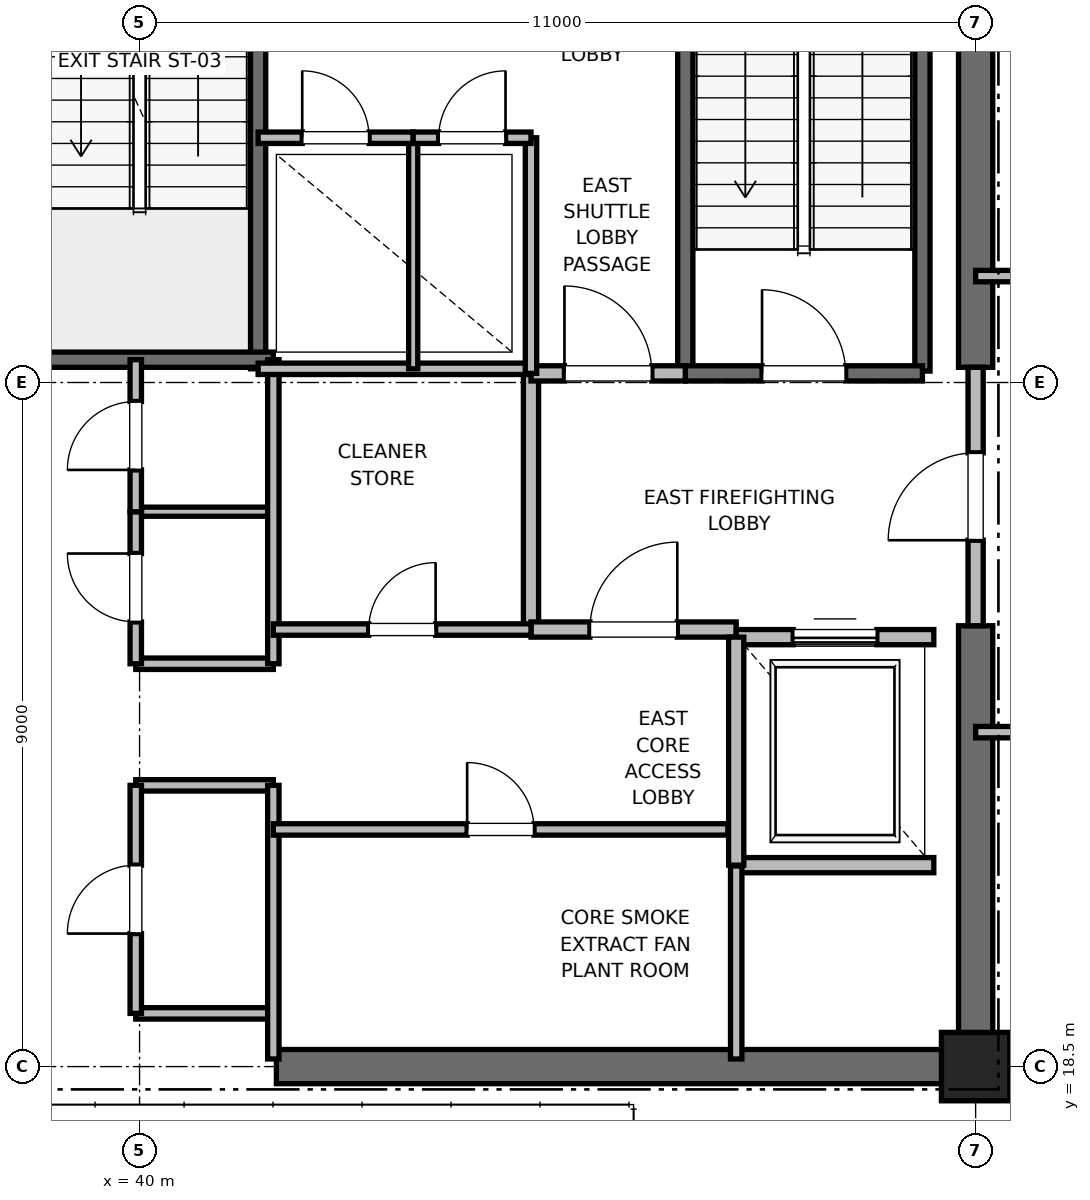
"""IFC4 building model, lengths in metres.
Left out: names, types, materials, properties, quantities, classifications, styles, units other than length and angle.
Written with IfcOpenShell. Run it as: python <this file> out.ifc"""

import sys

from ifc_helpers import new_model, si_unit, direction, frame, frame_2d, origin, origin_2d, place, context, subcontext, project, spatial, rectangle, extrude, element, fill, save


model = new_model("IFC4")
c1 = context("Model", 3, precision=1e-05, world=origin(), true_north=direction((0.0, 1.0)))
c2 = subcontext(c1, "Body", "Model", "MODEL_VIEW")
j1 = project(units=[si_unit("LENGTHUNIT", "METRE"), si_unit("PLANEANGLEUNIT", "RADIAN")], contexts=[c1])
p1 = place(None, origin())
s1 = spatial("IfcSite", under=j1, at=p1, CompositionType="ELEMENT")
p2 = place(p1, origin())
s2 = spatial("IfcBuilding", under=s1, at=p2, CompositionType="ELEMENT")
p3 = place(p2, frame((0.0, 0.0, 295.2)))
s3 = spatial("IfcBuildingStorey", under=s2, at=p3, CompositionType="ELEMENT", Elevation=295.2)
p4 = place(p3, frame((51.0, 18.5, 0.0), z_axis=(0.0, 0.0, 1.0), x_axis=(1.0, 0.0, 0.0)))
e1 = element("IfcColumn", 1, at=p4, inside=s3, PredefinedType="PILASTER", context=c2, shape_type="SweptSolid", body=[
    extrude(rectangle(XDim=0.9, YDim=0.9, at=origin_2d()), origin(), (0.0, 0.0, 1.0), 5.8),
])
p5 = place(p3, frame((41.8, 18.5, 0.0), z_axis=(0.0, 0.0, 1.0), x_axis=(1.0, 0.0, 0.0)))
e2 = element("IfcWall", 2, at=p5, inside=s3, PredefinedType="SHEAR", context=c2, shape_type="SweptSolid", body=[
    extrude(rectangle(XDim=9.2, YDim=0.45, at=frame_2d((4.6, 0.0))), origin(), (0.0, 0.0, 1.0), 5.5),
])
p6 = place(p3, frame((51.0, 18.5, 0.0), z_axis=(0.0, 0.0, 1.0), x_axis=(0.0, 1.0, 0.0)))
e3 = element("IfcWall", 3, at=p6, inside=s3, PredefinedType="SHEAR", context=c2, shape_type="SweptSolid", body=[
    extrude(rectangle(XDim=5.8, YDim=0.45, at=frame_2d((2.9, 0.0))), origin(), (0.0, 0.0, 1.0), 5.5),
])
p7 = place(p3, frame((51.0, 27.7, 0.0), z_axis=(0.0, 0.0, 1.0), x_axis=(0.0, 1.0, 0.0)))
e4 = element("IfcWall", 4, at=p7, inside=s3, PredefinedType="SHEAR", context=c2, shape_type="SweptSolid", body=[
    extrude(rectangle(XDim=8.8, YDim=0.45, at=frame_2d((4.4, 0.0))), origin(), (0.0, 0.0, 1.0), 5.5),
])
p8 = place(p3, frame((50.3, 27.65, 0.0), z_axis=(0.0, 0.0, 1.0), x_axis=(0.0, 1.0, 0.0)))
e5 = element("IfcWall", 5, at=p8, inside=s3, PredefinedType="SOLIDWALL", context=c2, shape_type="SweptSolid", body=[
    extrude(rectangle(XDim=8.15, YDim=0.2, at=frame_2d((4.075, 0.0))), origin(), (0.0, 0.0, 1.0), 5.5),
])
p9 = place(p3, frame((47.18, 27.62, 0.0), z_axis=(0.0, 0.0, 1.0), x_axis=(0.0, 1.0, 0.0)))
e6 = element("IfcWall", 6, at=p9, inside=s3, PredefinedType="SOLIDWALL", context=c2, shape_type="SweptSolid", body=[
    extrude(rectangle(XDim=8.18, YDim=0.2, at=frame_2d((4.09, 0.0))), origin(), (0.0, 0.0, 1.0), 5.5),
])
p10 = place(p3, frame((47.18, 27.62, 0.0), z_axis=(0.0, 0.0, 1.0), x_axis=(1.0, 0.0, 0.0)))
e7 = element("IfcWall", 7, at=p10, inside=s3, PredefinedType="SOLIDWALL", context=c2, shape_type="SweptSolid", body=[
    extrude(rectangle(XDim=3.12, YDim=0.2, at=frame_2d((1.56, 0.0))), origin(), (0.0, 0.0, 1.0), 5.5),
])
p11 = place(p10, frame((1.01, 0.0, 0.0)))
e8 = element("IfcOpeningElement", 8, at=p11, cuts=e7, PredefinedType="OPENING", context=c2, shape_type="SweptSolid", body=[
    extrude(rectangle(XDim=1.1, YDim=2.15, at=frame_2d((0.55, 1.075))), frame((0.0, 0.1, 0.0), z_axis=(0.0, -1.0, 0.0), x_axis=(1.0, 0.0, 0.0)), (0.0, 0.0, 1.0), 0.2),
])
p12 = place(p3, frame((41.56, 27.68, 0.0), z_axis=(0.0, 0.0, 1.0), x_axis=(0.0, 1.0, 0.0)))
e9 = element("IfcWall", 9, at=p12, inside=s3, PredefinedType="SOLIDWALL", context=c2, shape_type="SweptSolid", body=[
    extrude(rectangle(XDim=8.57, YDim=0.2, at=frame_2d((4.285, 0.0))), origin(), (0.0, 0.0, 1.0), 5.5),
])
p13 = place(p3, frame((38.44, 27.8, 0.0), z_axis=(0.0, 0.0, 1.0), x_axis=(1.0, 0.0, 0.0)))
e10 = element("IfcWall", 10, at=p13, inside=s3, PredefinedType="SOLIDWALL", context=c2, shape_type="SweptSolid", body=[
    extrude(rectangle(XDim=3.32, YDim=0.2, at=frame_2d((1.66, 0.0))), origin(), (0.0, 0.0, 1.0), 5.5),
])
p14 = place(p3, frame((45.15, 24.25, 0.0), z_axis=(0.0, 0.0, 1.0), x_axis=(0.0, 1.0, 0.0)))
e11 = element("IfcWall", 11, at=p14, inside=s3, PredefinedType="PARTITIONING", context=c2, shape_type="SweptSolid", body=[
    extrude(rectangle(XDim=3.37, YDim=0.2, at=frame_2d((1.685, 0.0))), origin(), (0.0, 0.0, 1.0), 5.5),
])
p15 = place(p3, frame((45.15, 24.25, 0.0), z_axis=(0.0, 0.0, 1.0), x_axis=(1.0, 0.0, 0.0)))
e12 = element("IfcWall", 12, at=p15, inside=s3, PredefinedType="PARTITIONING", context=c2, shape_type="SweptSolid", body=[
    extrude(rectangle(XDim=2.7, YDim=0.2, at=frame_2d((1.35, 0.0))), origin(), (0.0, 0.0, 1.0), 5.5),
])
p16 = place(p15, frame((0.775, 0.0, 0.0)))
e13 = element("IfcOpeningElement", 13, at=p16, cuts=e12, PredefinedType="OPENING", context=c2, shape_type="SweptSolid", body=[
    extrude(rectangle(XDim=1.15, YDim=2.2, at=frame_2d((0.575, 1.1))), frame((0.0, 0.1, 0.0), z_axis=(0.0, -1.0, 0.0), x_axis=(1.0, 0.0, 0.0)), (0.0, 0.0, 1.0), 0.2),
])
p17 = place(p3, frame((45.15, 27.62, 0.0), z_axis=(0.0, 0.0, 1.0), x_axis=(1.0, 0.0, 0.0)))
e14 = element("IfcWall", 14, at=p17, inside=s3, PredefinedType="PARTITIONING", context=c2, shape_type="SweptSolid", body=[
    extrude(rectangle(XDim=2.03, YDim=0.2, at=frame_2d((1.015, 0.0))), origin(), (0.0, 0.0, 1.0), 5.5),
])
p18 = place(p17, frame((0.44, 0.0, 0.0)))
e15 = element("IfcOpeningElement", 15, at=p18, cuts=e14, PredefinedType="OPENING", context=c2, shape_type="SweptSolid", body=[
    extrude(rectangle(XDim=1.15, YDim=2.2, at=frame_2d((0.575, 1.1))), frame((0.0, 0.1, 0.0), z_axis=(0.0, -1.0, 0.0), x_axis=(1.0, 0.0, 0.0)), (0.0, 0.0, 1.0), 0.2),
])
p19 = place(p3, frame((51.0, 24.3, 0.0), z_axis=(0.0, 0.0, 1.0), x_axis=(0.0, 1.0, 0.0)))
e16 = element("IfcWall", 16, at=p19, inside=s3, PredefinedType="PARTITIONING", context=c2, shape_type="SweptSolid", body=[
    extrude(rectangle(XDim=3.4, YDim=0.2, at=frame_2d((1.7, 0.0))), origin(), (0.0, 0.0, 1.0), 4.58),
])
p20 = place(p19, frame((1.125, 0.0, 0.0)))
e17 = element("IfcOpeningElement", 17, at=p20, cuts=e16, PredefinedType="OPENING", context=c2, shape_type="SweptSolid", body=[
    extrude(rectangle(XDim=1.15, YDim=2.2, at=frame_2d((0.575, 1.1))), frame((0.0, 0.1, 0.0), z_axis=(0.0, -1.0, 0.0), x_axis=(1.0, 0.0, 0.0)), (0.0, 0.0, 1.0), 0.2),
])
p21 = place(p3, frame((47.85, 21.15, 0.0), z_axis=(0.0, 0.0, 1.0), x_axis=(1.0, 0.0, 0.0)))
e18 = element("IfcWall", 18, at=p21, inside=s3, PredefinedType="SOLIDWALL", context=c2, shape_type="SweptSolid", body=[
    extrude(rectangle(XDim=2.6, YDim=0.2, at=frame_2d((1.3, 0.0))), origin(), (0.0, 0.0, 1.0), 5.5),
])
p22 = place(p3, frame((50.45, 24.15, 0.0), z_axis=(0.0, 0.0, 1.0), x_axis=(-1.0, 0.0, 0.0)))
e19 = element("IfcWall", 19, at=p22, inside=s3, PredefinedType="SOLIDWALL", context=c2, shape_type="SweptSolid", body=[
    extrude(rectangle(XDim=2.6, YDim=0.2, at=frame_2d((1.3, 0.0))), origin(), (0.0, 0.0, 1.0), 4.58),
])
p23 = place(p22, frame((0.75, 0.0, 0.0)))
e20 = element("IfcOpeningElement", 20, at=p23, cuts=e19, PredefinedType="OPENING", context=c2, shape_type="SweptSolid", body=[
    extrude(rectangle(XDim=1.1, YDim=2.2, at=frame_2d((0.55, 1.1))), frame((0.0, 0.1, 0.0), z_axis=(0.0, -1.0, 0.0), x_axis=(1.0, 0.0, 0.0)), (0.0, 0.0, 1.0), 0.2),
])
p24 = place(p3, frame((47.85, 24.15, 0.0), z_axis=(0.0, 0.0, 1.0), x_axis=(0.0, -1.0, 0.0)))
e21 = element("IfcWall", 21, at=p24, inside=s3, PredefinedType="SOLIDWALL", context=c2, shape_type="SweptSolid", body=[
    extrude(rectangle(XDim=3.0, YDim=0.2, at=frame_2d((1.5, 0.0))), origin(), (0.0, 0.0, 1.0), 5.5),
])
for number, where, z_axis, x_axis in (
    (22, (39.95, 19.2, 0.0), (0.0, 0.0, 1.0), (1.0, 0.0, 0.0)),
    (23, (39.95, 22.2, 0.0), (0.0, 0.0, 1.0), (1.0, 0.0, 0.0)),
    (24, (39.95, 23.8, 0.0), (0.0, 0.0, 1.0), (1.0, 0.0, 0.0)),
):
    element("IfcWall", number, at=place(p3, frame(where, z_axis=z_axis, x_axis=x_axis)), inside=s3, PredefinedType="PARTITIONING", context=c2, shape_type="SweptSolid", body=[
        extrude(rectangle(XDim=1.81, YDim=0.15, at=frame_2d((0.905, 0.0))), origin(), (0.0, 0.0, 1.0), 2.85),
    ])
p25 = place(p3, frame((39.95, 25.8, 0.0), z_axis=(0.0, 0.0, 1.0), x_axis=(1.0, 0.0, 0.0)))
e25 = element("IfcWall", 25, at=p25, inside=s3, PredefinedType="PARTITIONING", context=c2, shape_type="SweptSolid", body=[
    extrude(rectangle(XDim=1.81, YDim=0.12, at=frame_2d((0.905, 0.0))), origin(), (0.0, 0.0, 1.0), 2.85),
])
p26 = place(p3, frame((41.76, 18.6, 0.0), z_axis=(0.0, 0.0, 1.0), x_axis=(0.0, 1.0, 0.0)))
e26 = element("IfcWall", 26, at=p26, inside=s3, PredefinedType="PARTITIONING", context=c2, shape_type="SweptSolid", body=[
    extrude(rectangle(XDim=3.6, YDim=0.15, at=frame_2d((1.8, 0.0))), origin(), (0.0, 0.0, 1.0), 2.85),
])
p27 = place(p3, frame((41.76, 23.8, 0.0), z_axis=(0.0, 0.0, 1.0), x_axis=(0.0, 1.0, 0.0)))
e27 = element("IfcWall", 27, at=p27, inside=s3, PredefinedType="PARTITIONING", context=c2, shape_type="SweptSolid", body=[
    extrude(rectangle(XDim=4.0, YDim=0.15, at=frame_2d((2.0, 0.0))), origin(), (0.0, 0.0, 1.0), 2.85),
])
p28 = place(p3, frame((39.95, 19.2, 0.0), z_axis=(0.0, 0.0, 1.0), x_axis=(0.0, 1.0, 0.0)))
e28 = element("IfcWall", 28, at=p28, inside=s3, PredefinedType="PARTITIONING", context=c2, shape_type="SweptSolid", body=[
    extrude(rectangle(XDim=3.0, YDim=0.15, at=frame_2d((1.5, 0.0))), origin(), (0.0, 0.0, 1.0), 2.85),
])
p29 = place(p28, frame((1.05, 0.0, 0.0)))
e29 = element("IfcOpeningElement", 29, at=p29, cuts=e28, PredefinedType="OPENING", context=c2, shape_type="SweptSolid", body=[
    extrude(rectangle(XDim=0.9, YDim=2.1, at=frame_2d((0.45, 1.05))), frame((0.0, 0.075, 0.0), z_axis=(0.0, -1.0, 0.0), x_axis=(1.0, 0.0, 0.0)), (0.0, 0.0, 1.0), 0.15),
])
p30 = place(p3, frame((39.95, 23.8, 0.0), z_axis=(0.0, 0.0, 1.0), x_axis=(0.0, 1.0, 0.0)))
e30 = element("IfcWall", 30, at=p30, inside=s3, PredefinedType="PARTITIONING", context=c2, shape_type="SweptSolid", body=[
    extrude(rectangle(XDim=2.0, YDim=0.15, at=frame_2d((1.0, 0.0))), origin(), (0.0, 0.0, 1.0), 2.85),
])
p31 = place(p30, frame((0.55, 0.0, 0.0)))
e31 = element("IfcOpeningElement", 31, at=p31, cuts=e30, PredefinedType="OPENING", context=c2, shape_type="SweptSolid", body=[
    extrude(rectangle(XDim=0.9, YDim=2.1, at=frame_2d((0.45, 1.05))), frame((0.0, 0.075, 0.0), z_axis=(0.0, -1.0, 0.0), x_axis=(1.0, 0.0, 0.0)), (0.0, 0.0, 1.0), 0.15),
])
p32 = place(p3, frame((39.95, 25.8, 0.0), z_axis=(0.0, 0.0, 1.0), x_axis=(0.0, 1.0, 0.0)))
e32 = element("IfcWall", 32, at=p32, inside=s3, PredefinedType="PARTITIONING", context=c2, shape_type="SweptSolid", body=[
    extrude(rectangle(XDim=2.0, YDim=0.15, at=frame_2d((1.0, 0.0))), origin(), (0.0, 0.0, 1.0), 2.85),
])
p33 = place(p32, frame((0.55, 0.0, 0.0)))
e33 = element("IfcOpeningElement", 33, at=p33, cuts=e32, PredefinedType="OPENING", context=c2, shape_type="SweptSolid", body=[
    extrude(rectangle(XDim=0.9, YDim=2.1, at=frame_2d((0.45, 1.05))), frame((0.0, 0.075, 0.0), z_axis=(0.0, -1.0, 0.0), x_axis=(1.0, 0.0, 0.0)), (0.0, 0.0, 1.0), 0.15),
])
p34 = place(p3, frame((41.56, 27.68, 0.0), z_axis=(0.0, 0.0, 1.0), x_axis=(1.0, 0.0, 0.0)))
e34 = element("IfcWall", 34, at=p34, inside=s3, PredefinedType="PARTITIONING", context=c2, shape_type="SweptSolid", body=[
    extrude(rectangle(XDim=3.59, YDim=0.15, at=frame_2d((1.795, 0.0))), origin(), (0.0, 0.0, 1.0), 2.85),
])
p35 = place(p3, frame((47.85, 18.6, 0.0), z_axis=(0.0, 0.0, 1.0), x_axis=(0.0, 1.0, 0.0)))
e35 = element("IfcWall", 35, at=p35, inside=s3, PredefinedType="PARTITIONING", context=c2, shape_type="SweptSolid", body=[
    extrude(rectangle(XDim=2.54, YDim=0.15, at=frame_2d((1.27, 0.0))), origin(), (0.0, 0.0, 1.0), 2.85),
])
p36 = place(p3, frame((41.76, 21.62, 0.0), z_axis=(0.0, 0.0, 1.0), x_axis=(1.0, 0.0, 0.0)))
e36 = element("IfcWall", 36, at=p36, inside=s3, PredefinedType="PARTITIONING", context=c2, shape_type="SweptSolid", body=[
    extrude(rectangle(XDim=5.98, YDim=0.15, at=frame_2d((2.99, 0.0))), origin(), (0.0, 0.0, 1.0), 2.85),
])
p37 = place(p36, frame((2.55, 0.0, 0.0)))
e37 = element("IfcOpeningElement", 37, at=p37, cuts=e36, PredefinedType="OPENING", context=c2, shape_type="SweptSolid", body=[
    extrude(rectangle(XDim=0.88, YDim=2.1, at=frame_2d((0.44, 1.05))), frame((0.0, 0.075, 0.0), z_axis=(0.0, -1.0, 0.0), x_axis=(1.0, 0.0, 0.0)), (0.0, 0.0, 1.0), 0.15),
])
p38 = place(p3, frame((41.76, 24.25, 0.0), z_axis=(0.0, 0.0, 1.0), x_axis=(1.0, 0.0, 0.0)))
e38 = element("IfcWall", 38, at=p38, inside=s3, PredefinedType="PARTITIONING", context=c2, shape_type="SweptSolid", body=[
    extrude(rectangle(XDim=3.39, YDim=0.15, at=frame_2d((1.695, 0.0))), origin(), (0.0, 0.0, 1.0), 2.85),
])
p39 = place(p38, frame((1.255, 0.0, 0.0)))
e39 = element("IfcOpeningElement", 39, at=p39, cuts=e38, PredefinedType="OPENING", context=c2, shape_type="SweptSolid", body=[
    extrude(rectangle(XDim=0.88, YDim=2.1, at=frame_2d((0.44, 1.05))), frame((0.0, 0.075, 0.0), z_axis=(0.0, -1.0, 0.0), x_axis=(1.0, 0.0, 0.0)), (0.0, 0.0, 1.0), 0.15),
])
p40 = place(p3, frame((45.15, 27.62, 0.0), z_axis=(0.0, 0.0, 1.0), x_axis=(0.0, 1.0, 0.0)))
e40 = element("IfcWall", 40, at=p40, inside=s3, PredefinedType="PARTITIONING", context=c2, shape_type="SweptSolid", body=[
    extrude(rectangle(XDim=3.1, YDim=0.15, at=frame_2d((1.55, 0.0))), origin(), (0.0, 0.0, 1.0), 2.85),
])
p41 = place(p3, frame((43.6, 27.68, 0.0), z_axis=(0.0, 0.0, 1.0), x_axis=(0.0, 1.0, 0.0)))
e41 = element("IfcWall", 41, at=p41, inside=s3, PredefinedType="PARTITIONING", context=c2, shape_type="SweptSolid", body=[
    extrude(rectangle(XDim=3.04, YDim=0.12, at=frame_2d((1.52, 0.0))), origin(), (0.0, 0.0, 1.0), 2.85),
])
p42 = place(p3, frame((41.56, 30.72, 0.0), z_axis=(0.0, 0.0, 1.0), x_axis=(1.0, 0.0, 0.0)))
e42 = element("IfcWall", 42, at=p42, inside=s3, PredefinedType="PARTITIONING", context=c2, shape_type="SweptSolid", body=[
    extrude(rectangle(XDim=2.04, YDim=0.15, at=frame_2d((1.02, 0.0))), origin(), (0.0, 0.0, 1.0), 2.85),
])
p43 = place(p42, frame((0.58, 0.0, 0.0)))
e43 = element("IfcOpeningElement", 43, at=p43, cuts=e42, PredefinedType="OPENING", context=c2, shape_type="SweptSolid", body=[
    extrude(rectangle(XDim=0.88, YDim=2.1, at=frame_2d((0.44, 1.05))), frame((0.0, 0.075, 0.0), z_axis=(0.0, -1.0, 0.0), x_axis=(1.0, 0.0, 0.0)), (0.0, 0.0, 1.0), 0.15),
])
p44 = place(p3, frame((43.6, 30.72, 0.0), z_axis=(0.0, 0.0, 1.0), x_axis=(1.0, 0.0, 0.0)))
e44 = element("IfcWall", 44, at=p44, inside=s3, PredefinedType="PARTITIONING", context=c2, shape_type="SweptSolid", body=[
    extrude(rectangle(XDim=1.55, YDim=0.15, at=frame_2d((0.775, 0.0))), origin(), (0.0, 0.0, 1.0), 2.85),
])
p45 = place(p44, frame((0.335, 0.0, 0.0)))
e45 = element("IfcOpeningElement", 45, at=p45, cuts=e44, PredefinedType="OPENING", context=c2, shape_type="SweptSolid", body=[
    extrude(rectangle(XDim=0.88, YDim=2.1, at=frame_2d((0.44, 1.05))), frame((0.0, 0.075, 0.0), z_axis=(0.0, -1.0, 0.0), x_axis=(1.0, 0.0, 0.0)), (0.0, 0.0, 1.0), 0.15),
])
p46 = place(p3, frame((51.0, 22.9, 0.0), z_axis=(0.0, 0.0, 1.0), x_axis=(1.0, 0.0, 0.0)))
e46 = element("IfcWall", 46, at=p46, inside=s3, PredefinedType="PARTITIONING", context=c2, shape_type="SweptSolid", body=[
    extrude(rectangle(XDim=3.0, YDim=0.15, at=frame_2d((1.5, 0.0))), origin(), (0.0, 0.0, 1.0), 2.85),
])
p47 = place(p46, frame((1.025, 0.0, 0.0)))
e47 = element("IfcOpeningElement", 47, at=p47, cuts=e46, PredefinedType="OPENING", context=c2, shape_type="SweptSolid", body=[
    extrude(rectangle(XDim=0.95, YDim=2.15, at=frame_2d((0.475, 1.075))), frame((0.0, 0.075, 0.0), z_axis=(0.0, -1.0, 0.0), x_axis=(1.0, 0.0, 0.0)), (0.0, 0.0, 1.0), 0.15),
])
p48 = place(p3, frame((51.0, 28.9, 0.0), z_axis=(0.0, 0.0, 1.0), x_axis=(1.0, 0.0, 0.0)))
e48 = element("IfcWall", 48, at=p48, inside=s3, PredefinedType="PARTITIONING", context=c2, shape_type="SweptSolid", body=[
    extrude(rectangle(XDim=3.0, YDim=0.15, at=frame_2d((1.5, 0.0))), origin(), (0.0, 0.0, 1.0), 2.85),
])
p49 = place(p48, frame((1.025, 0.0, 0.0)))
e49 = element("IfcOpeningElement", 49, at=p49, cuts=e48, PredefinedType="OPENING", context=c2, shape_type="SweptSolid", body=[
    extrude(rectangle(XDim=0.95, YDim=2.15, at=frame_2d((0.475, 1.075))), frame((0.0, 0.075, 0.0), z_axis=(0.0, -1.0, 0.0), x_axis=(1.0, 0.0, 0.0)), (0.0, 0.0, 1.0), 0.15),
])
p50 = place(p11, origin())
e50 = element("IfcDoor", 50, at=p50, inside=s3, OperationType="SINGLE_SWING_LEFT", PredefinedType="DOOR", context=c2, shape_type="SweptSolid", body=[
    extrude(rectangle(XDim=1.1, YDim=2.15, at=frame_2d((0.55, 1.075))), frame((0.0, 0.025, 0.0), z_axis=(0.0, -1.0, 0.0), x_axis=(1.0, 0.0, 0.0)), (0.0, 0.0, 1.0), 0.05),
])
fill(e8, e50)
p51 = place(p16, origin())
e51 = element("IfcDoor", 51, at=p51, inside=s3, OperationType="SINGLE_SWING_RIGHT", PredefinedType="DOOR", context=c2, shape_type="SweptSolid", body=[
    extrude(rectangle(XDim=1.15, YDim=2.2, at=frame_2d((0.575, 1.1))), frame((0.0, 0.025, 0.0), z_axis=(0.0, -1.0, 0.0), x_axis=(1.0, 0.0, 0.0)), (0.0, 0.0, 1.0), 0.05),
])
fill(e13, e51)
p52 = place(p18, origin())
e52 = element("IfcDoor", 52, at=p52, inside=s3, OperationType="SINGLE_SWING_LEFT", PredefinedType="DOOR", context=c2, shape_type="SweptSolid", body=[
    extrude(rectangle(XDim=1.15, YDim=2.2, at=frame_2d((0.575, 1.1))), frame((0.0, 0.025, 0.0), z_axis=(0.0, -1.0, 0.0), x_axis=(1.0, 0.0, 0.0)), (0.0, 0.0, 1.0), 0.05),
])
fill(e15, e52)
p53 = place(p20, origin())
e53 = element("IfcDoor", 53, at=p53, inside=s3, OperationType="SINGLE_SWING_LEFT", PredefinedType="DOOR", context=c2, shape_type="SweptSolid", body=[
    extrude(rectangle(XDim=1.15, YDim=2.2, at=frame_2d((0.575, 1.1))), frame((0.0, 0.025, 0.0), z_axis=(0.0, -1.0, 0.0), x_axis=(1.0, 0.0, 0.0)), (0.0, 0.0, 1.0), 0.05),
])
fill(e17, e53)
p54 = place(p23, origin())
e54 = element("IfcDoor", 54, at=p54, inside=s3, OperationType="SLIDING_TO_RIGHT", PredefinedType="DOOR", context=c2, shape_type="SweptSolid", body=[
    extrude(rectangle(XDim=1.1, YDim=2.2, at=frame_2d((0.55, 1.1))), frame((0.0, 0.025, 0.0), z_axis=(0.0, -1.0, 0.0), x_axis=(1.0, 0.0, 0.0)), (0.0, 0.0, 1.0), 0.05),
])
fill(e20, e54)
p55 = place(p29, origin())
e55 = element("IfcDoor", 55, at=p55, inside=s3, OperationType="SINGLE_SWING_LEFT", PredefinedType="DOOR", context=c2, shape_type="SweptSolid", body=[
    extrude(rectangle(XDim=0.9, YDim=2.1, at=frame_2d((0.45, 1.05))), frame((0.0, 0.025, 0.0), z_axis=(0.0, -1.0, 0.0), x_axis=(1.0, 0.0, 0.0)), (0.0, 0.0, 1.0), 0.05),
])
fill(e29, e55)
p56 = place(p31, origin())
e56 = element("IfcDoor", 56, at=p56, inside=s3, OperationType="SINGLE_SWING_RIGHT", PredefinedType="DOOR", context=c2, shape_type="SweptSolid", body=[
    extrude(rectangle(XDim=0.9, YDim=2.1, at=frame_2d((0.45, 1.05))), frame((0.0, 0.025, 0.0), z_axis=(0.0, -1.0, 0.0), x_axis=(1.0, 0.0, 0.0)), (0.0, 0.0, 1.0), 0.05),
])
fill(e31, e56)
p57 = place(p33, origin())
e57 = element("IfcDoor", 57, at=p57, inside=s3, OperationType="SINGLE_SWING_LEFT", PredefinedType="DOOR", context=c2, shape_type="SweptSolid", body=[
    extrude(rectangle(XDim=0.9, YDim=2.1, at=frame_2d((0.45, 1.05))), frame((0.0, 0.025, 0.0), z_axis=(0.0, -1.0, 0.0), x_axis=(1.0, 0.0, 0.0)), (0.0, 0.0, 1.0), 0.05),
])
fill(e33, e57)
p58 = place(p37, origin())
e58 = element("IfcDoor", 58, at=p58, inside=s3, OperationType="SINGLE_SWING_LEFT", PredefinedType="DOOR", context=c2, shape_type="SweptSolid", body=[
    extrude(rectangle(XDim=0.88, YDim=2.1, at=frame_2d((0.44, 1.05))), frame((0.0, 0.025, 0.0), z_axis=(0.0, -1.0, 0.0), x_axis=(1.0, 0.0, 0.0)), (0.0, 0.0, 1.0), 0.05),
])
fill(e37, e58)
p59 = place(p39, origin())
e59 = element("IfcDoor", 59, at=p59, inside=s3, OperationType="SINGLE_SWING_RIGHT", PredefinedType="DOOR", context=c2, shape_type="SweptSolid", body=[
    extrude(rectangle(XDim=0.88, YDim=2.1, at=frame_2d((0.44, 1.05))), frame((0.0, 0.025, 0.0), z_axis=(0.0, -1.0, 0.0), x_axis=(1.0, 0.0, 0.0)), (0.0, 0.0, 1.0), 0.05),
])
fill(e39, e59)
p60 = place(p43, origin())
e60 = element("IfcDoor", 60, at=p60, inside=s3, OperationType="SINGLE_SWING_LEFT", PredefinedType="DOOR", context=c2, shape_type="SweptSolid", body=[
    extrude(rectangle(XDim=0.88, YDim=2.1, at=frame_2d((0.44, 1.05))), frame((0.0, 0.025, 0.0), z_axis=(0.0, -1.0, 0.0), x_axis=(1.0, 0.0, 0.0)), (0.0, 0.0, 1.0), 0.05),
])
fill(e43, e60)
p61 = place(p45, origin())
e61 = element("IfcDoor", 61, at=p61, inside=s3, OperationType="SINGLE_SWING_RIGHT", PredefinedType="DOOR", context=c2, shape_type="SweptSolid", body=[
    extrude(rectangle(XDim=0.88, YDim=2.1, at=frame_2d((0.44, 1.05))), frame((0.0, 0.025, 0.0), z_axis=(0.0, -1.0, 0.0), x_axis=(1.0, 0.0, 0.0)), (0.0, 0.0, 1.0), 0.05),
])
fill(e45, e61)
save(model, sys.argv[1])
